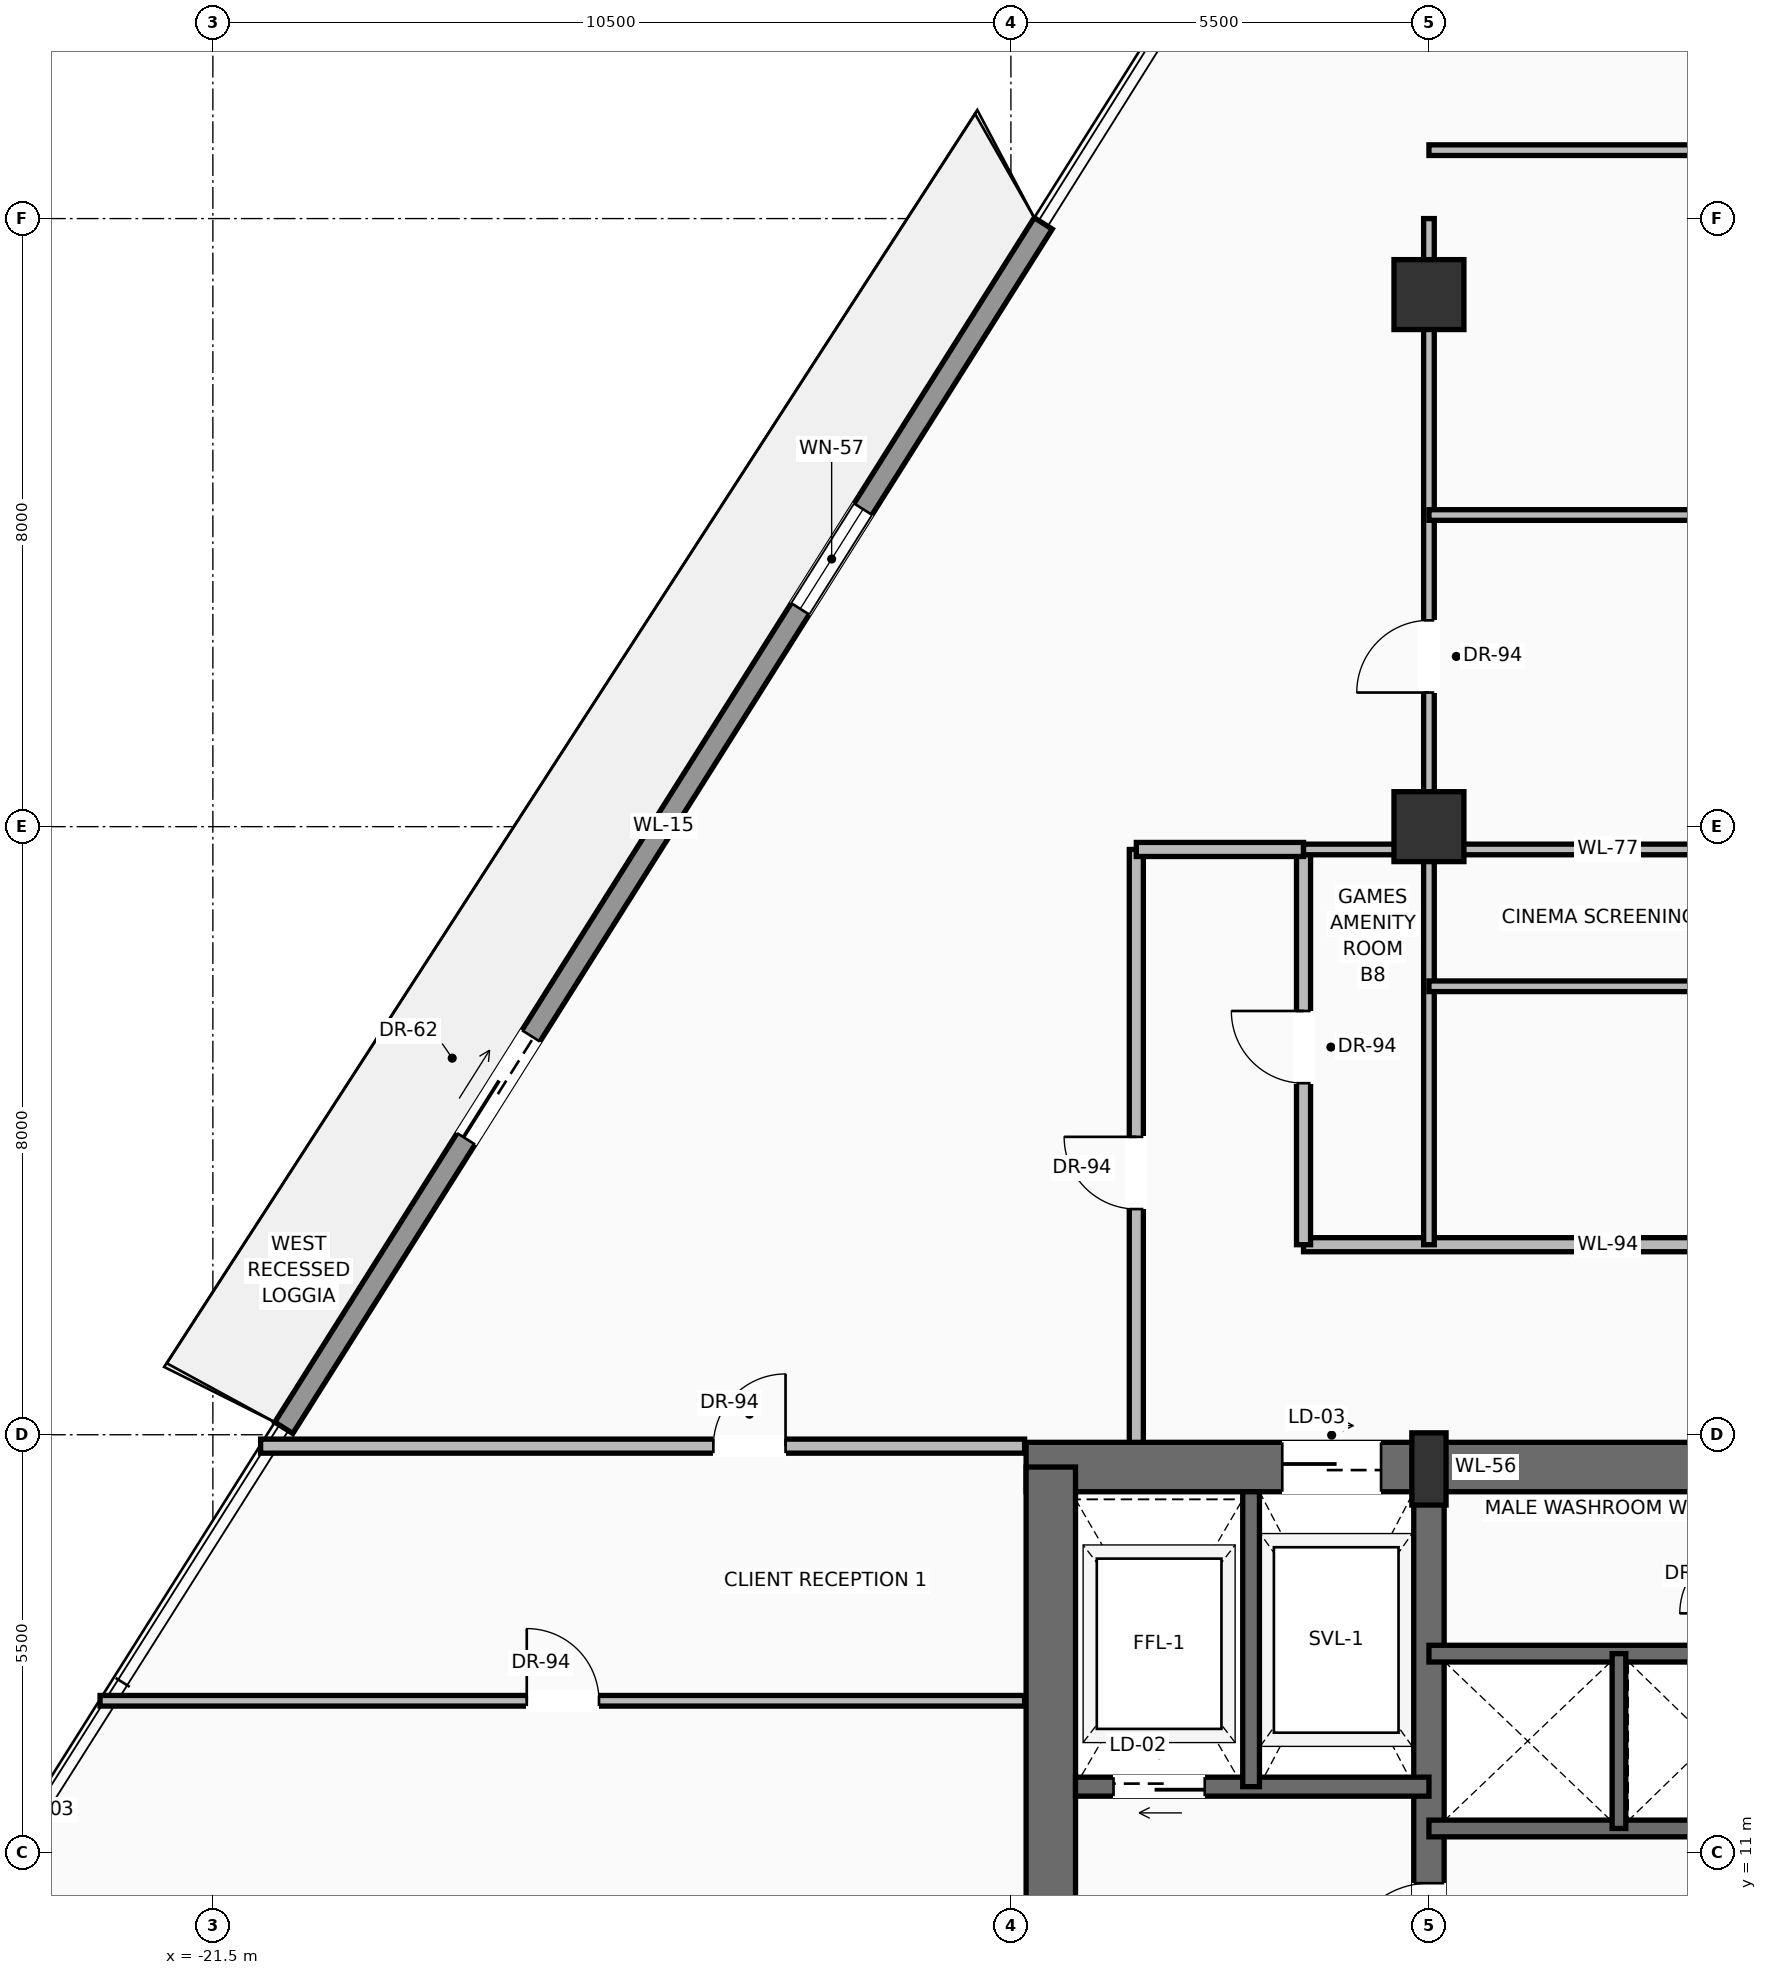
"""IFC4 building model, lengths in metres.
Left out: names, types, materials, properties, quantities, classifications, styles, units other than length and angle.
Written with IfcOpenShell. Run it as: python <this file> out.ifc"""

import sys

from ifc_helpers import new_model, si_unit, direction, frame, frame_2d, origin, origin_2d, place, context, subcontext, project, spatial, rectangle, extrude, source, transform, mapped, element, fill, save


model = new_model("IFC4")
c1 = context("Model", 3, precision=1e-05, world=origin(), true_north=direction((0.0, 1.0)))
c2 = subcontext(c1, "Body", "Model", "MODEL_VIEW")
j1 = project(units=[si_unit("LENGTHUNIT", "METRE"), si_unit("PLANEANGLEUNIT", "RADIAN")], contexts=[c1])
p1 = place(None, origin())
s1 = spatial("IfcSite", under=j1, at=p1, CompositionType="ELEMENT")
p2 = place(p1, origin())
s2 = spatial("IfcBuilding", under=s1, at=p2, CompositionType="ELEMENT")
p3 = place(p2, frame((0.0, 0.0, 171.0)))
s3 = spatial("IfcBuildingStorey", under=s2, at=p3, CompositionType="ELEMENT", Elevation=171.0)
p4 = place(p3, frame((-10.8, 16.075, 0.0), z_axis=(0.0, 0.0, 1.0), x_axis=(1.0, 0.0, 0.0)))
e1 = element("IfcWall", 1, at=p4, inside=s3, PredefinedType="SHEAR", context=c2, shape_type="SweptSolid", body=[
    extrude(rectangle(XDim=21.6, YDim=0.65, at=frame_2d((10.8, 0.0))), origin(), (0.0, 0.0, 1.0), 3.47),
])
p5 = place(p4, frame((3.37, 0.0, 0.0)))
e2 = element("IfcOpeningElement", 2, at=p5, cuts=e1, PredefinedType="OPENING", context=c2, shape_type="SweptSolid", body=[
    extrude(rectangle(XDim=1.3, YDim=2.3, at=frame_2d((0.65, 1.15))), frame((0.0, 0.335, 0.0), z_axis=(0.0, -1.0, 0.0), x_axis=(1.0, 0.0, 0.0)), (0.0, 0.0, 1.0), 0.67),
])
p6 = place(p4, frame((9.8, 0.0, 0.0)))
e3 = element("IfcOpeningElement", 3, at=p6, cuts=e1, PredefinedType="OPENING", context=c2, shape_type="SweptSolid", body=[
    extrude(rectangle(XDim=2.0, YDim=2.4, at=frame_2d((1.0, 1.2))), frame((0.0, 0.335, 0.0), z_axis=(0.0, -1.0, 0.0), x_axis=(1.0, 0.0, 0.0)), (0.0, 0.0, 1.0), 0.67),
])
p7 = place(p3, frame((-10.475, 0.525, 0.0), z_axis=(0.0, 0.0, 1.0), x_axis=(0.0, 1.0, 0.0)))
e4 = element("IfcWall", 4, at=p7, inside=s3, PredefinedType="SHEAR", context=c2, shape_type="SweptSolid", body=[
    extrude(rectangle(XDim=15.55, YDim=0.65, at=frame_2d((7.775, 0.0))), origin(), (0.0, 0.0, 1.0), 3.47),
])
p8 = place(p3, frame((-5.5, 0.525, 0.0), z_axis=(0.0, 0.0, 1.0), x_axis=(0.0, 1.0, 0.0)))
e5 = element("IfcWall", 5, at=p8, inside=s3, PredefinedType="SHEAR", context=c2, shape_type="SweptSolid", body=[
    extrude(rectangle(XDim=15.55, YDim=0.4, at=frame_2d((7.775, 0.0))), origin(), (0.0, 0.0, 1.0), 3.47),
])
p9 = place(p8, frame((8.975, 0.0, 0.0)))
e6 = element("IfcOpeningElement", 6, at=p9, cuts=e5, PredefinedType="OPENING", context=c2, shape_type="SweptSolid", body=[
    extrude(rectangle(XDim=1.1, YDim=2.2, at=frame_2d((0.55, 1.1))), frame((0.0, 0.21, 0.0), z_axis=(0.0, -1.0, 0.0), x_axis=(1.0, 0.0, 0.0)), (0.0, 0.0, 1.0), 0.42),
])
m1 = source(origin(), c2, "Body", "SweptSolid", [
    extrude(rectangle(XDim=0.45, YDim=0.95, at=origin_2d()), origin(), (0.0, 0.0, 1.0), 3.7),
])
p10 = place(p3, frame((-5.5, 16.05, 0.0), z_axis=(0.0, 0.0, 1.0), x_axis=(1.0, 0.0, 0.0)))
e7 = element("IfcColumn", 7, at=p10, inside=s3, PredefinedType="PILASTER", context=c2, shape_type="MappedRepresentation", body=[
    mapped(m1, transform((0.0, 0.0, 0.0), scale=1.0)),
])
m2 = source(origin(), c2, "Body", "SweptSolid", [
    extrude(rectangle(XDim=0.92, YDim=0.92, at=origin_2d()), origin(), (0.0, 0.0, 1.0), 3.7),
])
for number, where, z_axis, x_axis in (
    (8, (-5.5, 24.5, 0.0), (0.0, 0.0, 1.0), (1.0, 0.0, 0.0)),
    (9, (-5.5, 31.5, 0.0), (0.0, 0.0, 1.0), (1.0, 0.0, 0.0)),
):
    element("IfcColumn", number, at=place(p3, frame(where, z_axis=z_axis, x_axis=x_axis)), inside=s3, PredefinedType="COLUMN", context=c2, shape_type="MappedRepresentation", body=[
        mapped(m2, transform((0.0, 0.0, 0.0), scale=1.0)),
    ])
p11 = place(p3, frame((-20.567, 16.591, 0.0), z_axis=(0.0, 0.0, 1.0), x_axis=(0.533393167882, 0.845867441421, 0.0)))
e10 = element("IfcWall", 10, at=p11, inside=s3, PredefinedType="SOLIDWALL", context=c2, shape_type="SweptSolid", body=[
    extrude(rectangle(XDim=18.733, YDim=0.28, at=frame_2d((9.366, 0.0))), origin(), (0.0, 0.0, 1.0), 3.05),
])
p12 = place(p11, frame((4.496, 0.0, 0.0)))
e11 = element("IfcOpeningElement", 11, at=p12, cuts=e10, PredefinedType="OPENING", context=c2, shape_type="SweptSolid", body=[
    extrude(rectangle(XDim=1.6, YDim=2.35, at=frame_2d((0.8, 1.175))), frame((0.0, 0.15, 0.0), z_axis=(0.0, -1.0, 0.0), x_axis=(1.0, 0.0, 0.0)), (0.0, 0.0, 1.0), 0.3),
])
p13 = place(p11, frame((12.739, 0.0, 0.9)))
e12 = element("IfcOpeningElement", 12, at=p13, cuts=e10, PredefinedType="OPENING", context=c2, shape_type="SweptSolid", body=[
    extrude(rectangle(XDim=1.55, YDim=1.85, at=frame_2d((0.775, 0.925))), frame((0.0, 0.15, 0.0), z_axis=(0.0, -1.0, 0.0), x_axis=(1.0, 0.0, 0.0)), (0.0, 0.0, 1.0), 0.3),
])
p14 = place(p3, frame((-5.5, 11.87, 0.0), z_axis=(0.0, 0.0, 1.0), x_axis=(-1.0, 0.0, 0.0)))
e13 = element("IfcWall", 13, at=p14, inside=s3, PredefinedType="SOLIDWALL", context=c2, shape_type="SweptSolid", body=[
    extrude(rectangle(XDim=4.65, YDim=0.25, at=frame_2d((2.325, 0.0))), origin(), (0.0, 0.0, 1.0), 3.47),
])
p15 = place(p14, frame((2.95, 0.0, 0.0)))
e14 = element("IfcOpeningElement", 14, at=p15, cuts=e13, PredefinedType="OPENING", context=c2, shape_type="SweptSolid", body=[
    extrude(rectangle(XDim=1.2, YDim=2.25, at=frame_2d((0.6, 1.125))), frame((0.0, 0.135, 0.0), z_axis=(0.0, -1.0, 0.0), x_axis=(1.0, 0.0, 0.0)), (0.0, 0.0, 1.0), 0.27),
])
p16 = place(p3, frame((-7.84, 11.87, 0.0), z_axis=(0.0, 0.0, 1.0), x_axis=(0.0, 1.0, 0.0)))
e15 = element("IfcWall", 15, at=p16, inside=s3, PredefinedType="SOLIDWALL", context=c2, shape_type="SweptSolid", body=[
    extrude(rectangle(XDim=3.88, YDim=0.22, at=frame_2d((1.94, 0.0))), origin(), (0.0, 0.0, 1.0), 3.47),
])
for number, where, z_axis, x_axis in (
    (16, (-5.5, 11.32, 0.0), (0.0, 0.0, 1.0), (1.0, 0.0, 0.0)),
    (17, (-5.5, 13.62, 0.0), (0.0, 0.0, 1.0), (1.0, 0.0, 0.0)),
):
    element("IfcWall", number, at=place(p3, frame(where, z_axis=z_axis, x_axis=x_axis)), inside=s3, PredefinedType="SOLIDWALL", context=c2, shape_type="SweptSolid", body=[
        extrude(rectangle(XDim=7.32, YDim=0.22, at=frame_2d((3.66, 0.0))), origin(), (0.0, 0.0, 1.0), 3.47),
    ])
p17 = place(p3, frame((-3.0, 11.32, 0.0), z_axis=(0.0, 0.0, 1.0), x_axis=(0.0, 1.0, 0.0)))
e18 = element("IfcWall", 18, at=p17, inside=s3, PredefinedType="SOLIDWALL", context=c2, shape_type="SweptSolid", body=[
    extrude(rectangle(XDim=2.3, YDim=0.18, at=frame_2d((1.15, 0.0))), origin(), (0.0, 0.0, 1.0), 3.47),
])
p18 = place(p3, frame((-7.15, 19.0, 0.0), z_axis=(0.0, 0.0, 1.0), x_axis=(1.0, 0.0, 0.0)))
e19 = element("IfcWall", 19, at=p18, inside=s3, PredefinedType="PARTITIONING", context=c2, shape_type="SweptSolid", body=[
    extrude(rectangle(XDim=14.3, YDim=0.185, at=frame_2d((7.15, 0.0))), origin(), (0.0, 0.0, 1.0), 2.846),
])
p19 = place(p18, frame((6.675, 0.0, 0.0)))
e20 = element("IfcOpeningElement", 20, at=p19, cuts=e19, PredefinedType="OPENING", context=c2, shape_type="SweptSolid", body=[
    extrude(rectangle(XDim=0.95, YDim=2.2, at=frame_2d((0.475, 1.1))), frame((0.0, 0.103, 0.0), z_axis=(0.0, -1.0, 0.0), x_axis=(1.0, 0.0, 0.0)), (0.0, 0.0, 1.0), 0.205),
])
p20 = place(p3, frame((-7.15, 19.0, 0.0), z_axis=(0.0, 0.0, 1.0), x_axis=(0.0, 1.0, 0.0)))
e21 = element("IfcWall", 21, at=p20, inside=s3, PredefinedType="PARTITIONING", context=c2, shape_type="SweptSolid", body=[
    extrude(rectangle(XDim=5.2, YDim=0.185, at=frame_2d((2.6, 0.0))), origin(), (0.0, 0.0, 1.0), 3.462),
])
p21 = place(p20, frame((2.125, 0.0, 0.0)))
e22 = element("IfcOpeningElement", 22, at=p21, cuts=e21, PredefinedType="OPENING", context=c2, shape_type="SweptSolid", body=[
    extrude(rectangle(XDim=0.95, YDim=2.2, at=frame_2d((0.475, 1.1))), frame((0.0, 0.103, 0.0), z_axis=(0.0, -1.0, 0.0), x_axis=(1.0, 0.0, 0.0)), (0.0, 0.0, 1.0), 0.205),
])
p22 = place(p3, frame((-9.35, 16.4, 0.0), z_axis=(0.0, 0.0, 1.0), x_axis=(0.0, 1.0, 0.0)))
e23 = element("IfcWall", 23, at=p22, inside=s3, PredefinedType="PARTITIONING", context=c2, shape_type="SweptSolid", body=[
    extrude(rectangle(XDim=7.8, YDim=0.185, at=frame_2d((3.9, 0.0))), origin(), (0.0, 0.0, 1.0), 3.462),
])
p23 = place(p22, frame((3.069, 0.0, 0.0)))
e24 = element("IfcOpeningElement", 24, at=p23, cuts=e23, PredefinedType="OPENING", context=c2, shape_type="SweptSolid", body=[
    extrude(rectangle(XDim=0.95, YDim=2.2, at=frame_2d((0.475, 1.1))), frame((0.0, 0.103, 0.0), z_axis=(0.0, -1.0, 0.0), x_axis=(1.0, 0.0, 0.0)), (0.0, 0.0, 1.0), 0.205),
])
p24 = place(p3, frame((-9.35, 24.2, 0.0), z_axis=(0.0, 0.0, 1.0), x_axis=(1.0, 0.0, 0.0)))
e25 = element("IfcWall", 25, at=p24, inside=s3, PredefinedType="PARTITIONING", context=c2, shape_type="SweptSolid", body=[
    extrude(rectangle(XDim=2.2, YDim=0.185, at=frame_2d((1.1, 0.0))), origin(), (0.0, 0.0, 1.0), 3.462),
])
p25 = place(p3, frame((-20.872, 16.35, 0.0), z_axis=(0.0, 0.0, 1.0), x_axis=(1.0, 0.0, 0.0)))
e26 = element("IfcWall", 26, at=p25, inside=s3, PredefinedType="PARTITIONING", context=c2, shape_type="SweptSolid", body=[
    extrude(rectangle(XDim=10.052, YDim=0.185, at=frame_2d((5.026, 0.0))), origin(), (0.0, 0.0, 1.0), 3.462),
])
p26 = place(p25, frame((5.957, 0.0, 0.0)))
e27 = element("IfcOpeningElement", 27, at=p26, cuts=e26, PredefinedType="OPENING", context=c2, shape_type="SweptSolid", body=[
    extrude(rectangle(XDim=0.95, YDim=2.2, at=frame_2d((0.475, 1.1))), frame((0.0, 0.103, 0.0), z_axis=(0.0, -1.0, 0.0), x_axis=(1.0, 0.0, 0.0)), (0.0, 0.0, 1.0), 0.205),
])
p27 = place(p3, frame((-7.15, 24.2, 0.0), z_axis=(0.0, 0.0, 1.0), x_axis=(1.0, 0.0, 0.0)))
e28 = element("IfcWall", 28, at=p27, inside=s3, PredefinedType="PARTITIONING", context=c2, shape_type="SweptSolid", body=[
    extrude(rectangle(XDim=14.3, YDim=0.14, at=frame_2d((7.15, 0.0))), origin(), (0.0, 0.0, 1.0), 3.462),
])
p28 = place(p3, frame((-5.5, 19.0, 0.0), z_axis=(0.0, 0.0, 1.0), x_axis=(0.0, 1.0, 0.0)))
e29 = element("IfcWall", 29, at=p28, inside=s3, PredefinedType="PARTITIONING", context=c2, shape_type="SweptSolid", body=[
    extrude(rectangle(XDim=13.5, YDim=0.14, at=frame_2d((6.75, 0.0))), origin(), (0.0, 0.0, 1.0), 2.846),
])
p29 = place(p28, frame((7.264, 0.0, 0.0)))
e30 = element("IfcOpeningElement", 30, at=p29, cuts=e29, PredefinedType="OPENING", context=c2, shape_type="SweptSolid", body=[
    extrude(rectangle(XDim=0.95, YDim=2.2, at=frame_2d((0.475, 1.1))), frame((0.0, 0.08, 0.0), z_axis=(0.0, -1.0, 0.0), x_axis=(1.0, 0.0, 0.0)), (0.0, 0.0, 1.0), 0.16),
])
p30 = place(p3, frame((-5.5, 22.4, 0.0), z_axis=(0.0, 0.0, 1.0), x_axis=(1.0, 0.0, 0.0)))
e31 = element("IfcWall", 31, at=p30, inside=s3, PredefinedType="PARTITIONING", context=c2, shape_type="SweptSolid", body=[
    extrude(rectangle(XDim=11.0, YDim=0.14, at=frame_2d((5.5, 0.0))), origin(), (0.0, 0.0, 1.0), 3.462),
])
p31 = place(p30, frame((5.025, 0.0, 0.0)))
e32 = element("IfcOpeningElement", 32, at=p31, cuts=e31, PredefinedType="OPENING", context=c2, shape_type="SweptSolid", body=[
    extrude(rectangle(XDim=0.95, YDim=2.2, at=frame_2d((0.475, 1.1))), frame((0.0, 0.08, 0.0), z_axis=(0.0, -1.0, 0.0), x_axis=(1.0, 0.0, 0.0)), (0.0, 0.0, 1.0), 0.16),
])
for number, where, z_axis, x_axis in (
    (33, (-5.5, 28.6, 0.0), (0.0, 0.0, 1.0), (1.0, 0.0, 0.0)),
    (34, (-5.5, 33.4, 0.0), (0.0, 0.0, 1.0), (1.0, 0.0, 0.0)),
):
    element("IfcWall", number, at=place(p3, frame(where, z_axis=z_axis, x_axis=x_axis)), inside=s3, PredefinedType="PARTITIONING", context=c2, shape_type="SweptSolid", body=[
        extrude(rectangle(XDim=11.0, YDim=0.14, at=frame_2d((5.5, 0.0))), origin(), (0.0, 0.0, 1.0), 3.462),
    ])
p32 = place(p3, frame((-22.984, 13.0, 0.0), z_axis=(0.0, 0.0, 1.0), x_axis=(1.0, 0.0, 0.0)))
e35 = element("IfcWall", 35, at=p32, inside=s3, PredefinedType="PARTITIONING", context=c2, shape_type="SweptSolid", body=[
    extrude(rectangle(XDim=12.164, YDim=0.14, at=frame_2d((6.082, 0.0))), origin(), (0.0, 0.0, 1.0), 3.462),
])
p33 = place(p32, frame((5.615, 0.0, 0.0)))
e36 = element("IfcOpeningElement", 36, at=p33, cuts=e35, PredefinedType="OPENING", context=c2, shape_type="SweptSolid", body=[
    extrude(rectangle(XDim=0.95, YDim=2.2, at=frame_2d((0.475, 1.1))), frame((0.0, 0.08, 0.0), z_axis=(0.0, -1.0, 0.0), x_axis=(1.0, 0.0, 0.0)), (0.0, 0.0, 1.0), 0.16),
])
m3 = source(origin(), c2, "Body", "SweptSolid", [
    extrude(rectangle(XDim=1.6, YDim=2.35, at=frame_2d((0.8, 1.175))), frame((0.0, 0.025, 0.0), z_axis=(0.0, -1.0, 0.0), x_axis=(1.0, 0.0, 0.0)), (0.0, 0.0, 1.0), 0.05),
])
p34 = place(p12, origin())
e37 = element("IfcDoor", 37, at=p34, inside=s3, OperationType="SLIDING_TO_LEFT", PredefinedType="DOOR", context=c2, shape_type="MappedRepresentation", body=[
    mapped(m3, transform((0.0, 0.0, 0.0), scale=1.0)),
])
fill(e11, e37)
m4 = source(origin(), c2, "Body", "SweptSolid", [
    extrude(rectangle(XDim=1.55, YDim=1.85, at=frame_2d((0.775, 0.925))), frame((0.0, 0.03, 0.0), z_axis=(0.0, -1.0, 0.0), x_axis=(1.0, 0.0, 0.0)), (0.0, 0.0, 1.0), 0.06),
])
p35 = place(p13, origin())
e38 = element("IfcWindow", 38, at=p35, inside=s3, PartitioningType="SINGLE_PANEL", PredefinedType="WINDOW", context=c2, shape_type="MappedRepresentation", body=[
    mapped(m4, transform((0.0, 0.0, 0.0), scale=1.0)),
])
fill(e12, e38)
m5 = source(origin(), c2, "Body", "SweptSolid", [
    extrude(rectangle(XDim=1.1, YDim=2.2, at=frame_2d((0.55, 1.1))), frame((0.0, 0.025, 0.0), z_axis=(0.0, -1.0, 0.0), x_axis=(1.0, 0.0, 0.0)), (0.0, 0.0, 1.0), 0.05),
])
p36 = place(p9, origin())
e39 = element("IfcDoor", 39, at=p36, inside=s3, OperationType="SINGLE_SWING_LEFT", PredefinedType="DOOR", context=c2, shape_type="MappedRepresentation", body=[
    mapped(m5, transform((0.0, 0.0, 0.0), scale=1.0)),
])
fill(e6, e39)
m6 = source(origin(), c2, "Body", "SweptSolid", [
    extrude(rectangle(XDim=1.2, YDim=2.25, at=frame_2d((0.6, 1.125))), frame((0.0, 0.025, 0.0), z_axis=(0.0, -1.0, 0.0), x_axis=(1.0, 0.0, 0.0)), (0.0, 0.0, 1.0), 0.05),
])
p37 = place(p15, origin())
e40 = element("IfcDoor", 40, at=p37, inside=s3, OperationType="SLIDING_TO_LEFT", PredefinedType="DOOR", context=c2, shape_type="MappedRepresentation", body=[
    mapped(m6, transform((0.0, 0.0, 0.0), scale=1.0)),
])
fill(e14, e40)
m7 = source(origin(), c2, "Body", "SweptSolid", [
    extrude(rectangle(XDim=1.3, YDim=2.3, at=frame_2d((0.65, 1.15))), frame((0.0, 0.025, 0.0), z_axis=(0.0, -1.0, 0.0), x_axis=(1.0, 0.0, 0.0)), (0.0, 0.0, 1.0), 0.05),
])
p38 = place(p5, origin())
e41 = element("IfcDoor", 41, at=p38, inside=s3, OperationType="SLIDING_TO_RIGHT", PredefinedType="DOOR", context=c2, shape_type="MappedRepresentation", body=[
    mapped(m7, transform((0.0, 0.0, 0.0), scale=1.0)),
])
fill(e2, e41)
m8 = source(origin(), c2, "Body", "SweptSolid", [
    extrude(rectangle(XDim=0.95, YDim=2.2, at=frame_2d((0.475, 1.1))), frame((0.0, 0.025, 0.0), z_axis=(0.0, -1.0, 0.0), x_axis=(1.0, 0.0, 0.0)), (0.0, 0.0, 1.0), 0.05),
])
p39 = place(p23, origin())
e42 = element("IfcDoor", 42, at=p39, inside=s3, OperationType="SINGLE_SWING_RIGHT", PredefinedType="DOOR", context=c2, shape_type="MappedRepresentation", body=[
    mapped(m8, transform((0.0, 0.0, 0.0), scale=1.0)),
])
fill(e24, e42)
p40 = place(p26, origin())
e43 = element("IfcDoor", 43, at=p40, inside=s3, OperationType="SINGLE_SWING_RIGHT", PredefinedType="DOOR", context=c2, shape_type="MappedRepresentation", body=[
    mapped(m8, transform((0.0, 0.0, 0.0), scale=1.0)),
])
fill(e27, e43)
p41 = place(p33, origin())
e44 = element("IfcDoor", 44, at=p41, inside=s3, OperationType="SINGLE_SWING_LEFT", PredefinedType="DOOR", context=c2, shape_type="MappedRepresentation", body=[
    mapped(m8, transform((0.0, 0.0, 0.0), scale=1.0)),
])
fill(e36, e44)
p42 = place(p21, origin())
e45 = element("IfcDoor", 45, at=p42, inside=s3, OperationType="SINGLE_SWING_RIGHT", PredefinedType="DOOR", context=c2, shape_type="MappedRepresentation", body=[
    mapped(m8, transform((0.0, 0.0, 0.0), scale=1.0)),
])
fill(e22, e45)
p43 = place(p29, origin())
e46 = element("IfcDoor", 46, at=p43, inside=s3, OperationType="SINGLE_SWING_LEFT", PredefinedType="DOOR", context=c2, shape_type="MappedRepresentation", body=[
    mapped(m8, transform((0.0, 0.0, 0.0), scale=1.0)),
])
fill(e30, e46)
save(model, sys.argv[1])
